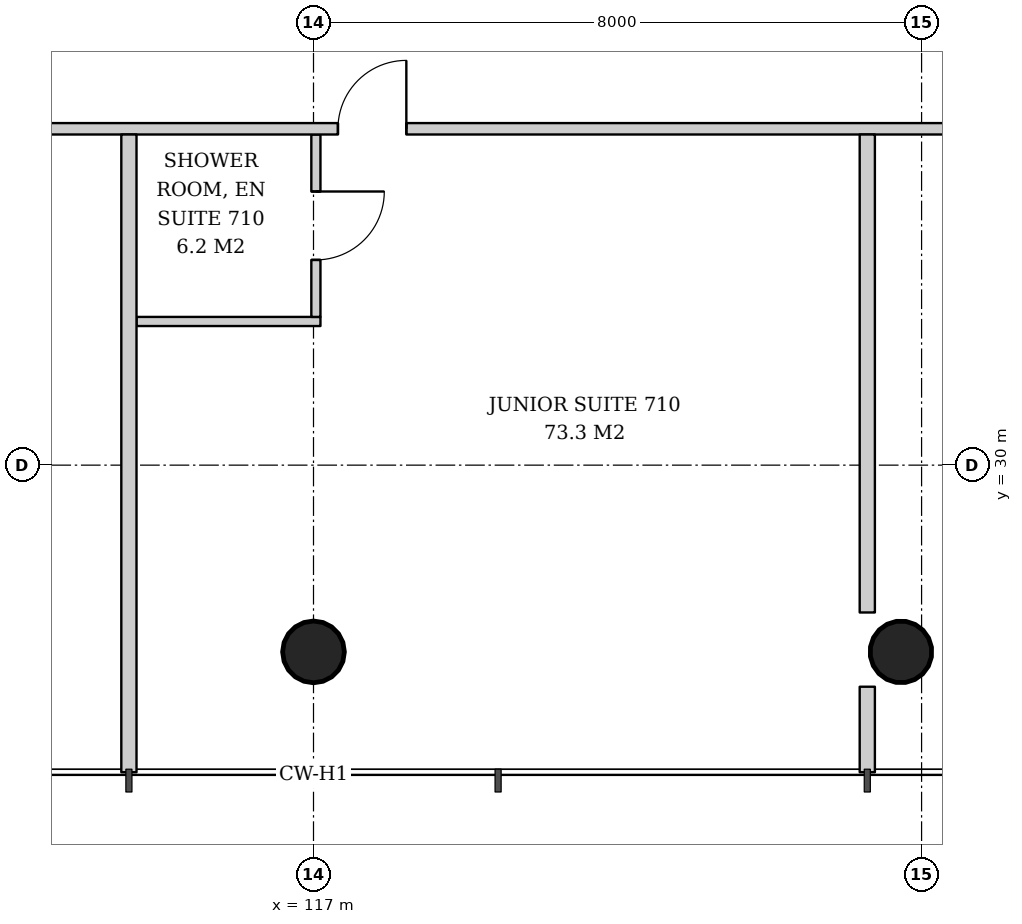
"""IFC4 building model, lengths in metres.
Left out: names, types, materials, properties, quantities, classifications, styles, units other than length and angle.
Written with IfcOpenShell. Run it as: python <this file> out.ifc"""

import sys

from ifc_helpers import new_model, si_unit, direction, frame, frame_2d, origin, origin_2d, place, context, subcontext, project, spatial, rectangle, hollow_circle, extrude, element, fill, save


model = new_model("IFC4")
c1 = context("Model", 3, precision=1e-05, world=origin(), true_north=direction((0.0, 1.0)))
c2 = subcontext(c1, "Body", "Model", "MODEL_VIEW")
j1 = project(units=[si_unit("LENGTHUNIT", "METRE"), si_unit("PLANEANGLEUNIT", "RADIAN")], contexts=[c1])
p1 = place(None, origin())
s1 = spatial("IfcSite", under=j1, at=p1, CompositionType="ELEMENT")
p2 = place(p1, origin())
s2 = spatial("IfcBuilding", under=s1, at=p2, CompositionType="ELEMENT")
p3 = place(p2, frame((0.0, 0.0, 32.4)))
s3 = spatial("IfcBuildingStorey", under=s2, at=p3, CompositionType="ELEMENT", Elevation=32.4)
p4 = place(p3, frame((117.0, 27.491, 0.0), z_axis=(0.0, 0.043069538298, 0.999072076915), x_axis=(-1.0, 0.0, 0.0)))
e1 = element("IfcColumn", 1, at=p4, inside=s3, PredefinedType="COLUMN", context=c2, shape_type="SweptSolid", body=[
    extrude(hollow_circle(Radius=0.406, WallThickness=0.03, at=origin_2d()), origin(), (0.0, 0.0, 1.0), 3.803),
])
p5 = place(p3, frame((124.754, 27.491, 0.0), z_axis=(-0.021561848751, 0.043059525333, 0.998839808957), x_axis=(-0.894160516368, -0.44774654769, 0.0)))
e2 = element("IfcColumn", 2, at=p5, inside=s3, PredefinedType="COLUMN", context=c2, shape_type="SweptSolid", body=[
    extrude(hollow_circle(Radius=0.406, WallThickness=0.03, at=origin_2d()), origin(), (0.0, 0.0, 1.0), 3.804),
])
p6 = place(p3, frame((114.671, 31.89, 0.0), z_axis=(0.0, 0.0, 1.0), x_axis=(1.0, 0.0, 0.0)))
e3 = element("IfcWall", 3, at=p6, inside=s3, PredefinedType="PARTITIONING", context=c2, shape_type="SweptSolid", body=[
    extrude(rectangle(XDim=2.42, YDim=0.12, at=frame_2d((1.21, 0.0))), origin(), (0.0, 0.0, 1.0), 2.847),
])
p7 = place(p3, frame((117.031, 34.35, 0.0), z_axis=(0.0, 0.0, 1.0), x_axis=(0.0, -1.0, 0.0)))
e4 = element("IfcWall", 4, at=p7, inside=s3, PredefinedType="PARTITIONING", context=c2, shape_type="SweptSolid", body=[
    extrude(rectangle(XDim=2.4, YDim=0.12, at=frame_2d((1.2, 0.0))), origin(), (0.0, 0.0, 1.0), 3.6),
])
p8 = place(p7, frame((0.75, 0.0, 0.0)))
e5 = element("IfcOpeningElement", 5, at=p8, cuts=e4, PredefinedType="OPENING", context=c2, shape_type="SweptSolid", body=[
    extrude(rectangle(XDim=0.9, YDim=2.1, at=frame_2d((0.45, 1.05))), frame((0.0, 0.07, 0.0), z_axis=(0.0, -1.0, 0.0), x_axis=(1.0, 0.0, 0.0)), (0.0, 0.0, 1.0), 0.14),
])
p9 = place(p3, frame((105.35, 34.425, 0.0), z_axis=(0.0, 0.0, 1.0), x_axis=(1.0, 0.0, 0.0)))
e6 = element("IfcWall", 6, at=p9, inside=s3, PredefinedType="PARTITIONING", context=c2, shape_type="SweptSolid", body=[
    extrude(rectangle(XDim=23.15, YDim=0.15, at=frame_2d((11.575, 0.0))), origin(), (0.0, 0.0, 1.0), 2.8),
])
p10 = place(p9, frame((1.757, 0.0, 0.0)))
e7 = element("IfcOpeningElement", 7, at=p10, cuts=e6, PredefinedType="OPENING", context=c2, shape_type="SweptSolid", body=[
    extrude(rectangle(XDim=0.9, YDim=2.1, at=frame_2d((0.45, 1.05))), frame((0.0, 0.085, 0.0), z_axis=(0.0, -1.0, 0.0), x_axis=(1.0, 0.0, 0.0)), (0.0, 0.0, 1.0), 0.17),
])
p11 = place(p9, frame((11.971, 0.0, 0.0)))
e8 = element("IfcOpeningElement", 8, at=p11, cuts=e6, PredefinedType="OPENING", context=c2, shape_type="SweptSolid", body=[
    extrude(rectangle(XDim=0.9, YDim=2.1, at=frame_2d((0.45, 1.05))), frame((0.0, 0.085, 0.0), z_axis=(0.0, -1.0, 0.0), x_axis=(1.0, 0.0, 0.0)), (0.0, 0.0, 1.0), 0.17),
])
p12 = place(p3, frame((114.572, 34.35, 0.0), z_axis=(0.0, 0.0, 1.0), x_axis=(0.0, -1.0, 0.0)))
e9 = element("IfcWall", 9, at=p12, inside=s3, PredefinedType="PARTITIONING", context=c2, shape_type="SweptSolid", body=[
    extrude(rectangle(XDim=8.39, YDim=0.2, at=frame_2d((4.195, 0.0))), origin(), (0.0, 0.0, 1.0), 3.05),
])
p13 = place(p3, frame((124.286, 34.35, 0.0), z_axis=(0.0, 0.0, 1.0), x_axis=(0.0, -1.0, 0.0)))
e10 = element("IfcWall", 10, at=p13, inside=s3, PredefinedType="PARTITIONING", context=c2, shape_type="SweptSolid", body=[
    extrude(rectangle(XDim=6.288, YDim=0.2, at=frame_2d((3.144, 0.0))), origin(), (0.0, 0.0, 1.0), 3.6),
])
p14 = place(p3, frame((124.286, 27.085, 0.0), z_axis=(0.0, 0.0, 1.0), x_axis=(0.0, -1.0, 0.0)))
e11 = element("IfcWall", 11, at=p14, inside=s3, PredefinedType="PARTITIONING", context=c2, shape_type="SweptSolid", body=[
    extrude(rectangle(XDim=1.125, YDim=0.2, at=frame_2d((0.562, 0.0))), origin(), (0.0, 0.0, 1.0), 3.6),
])
p15 = place(p8, origin())
e12 = element("IfcDoor", 12, at=p15, inside=s3, OperationType="SINGLE_SWING_LEFT", PredefinedType="DOOR", context=c2, shape_type="SweptSolid", body=[
    extrude(rectangle(XDim=0.9, YDim=2.1, at=frame_2d((0.45, 1.05))), frame((0.0, 0.025, 0.0), z_axis=(0.0, -1.0, 0.0), x_axis=(1.0, 0.0, 0.0)), (0.0, 0.0, 1.0), 0.05),
])
fill(e5, e12)
p16 = place(p11, origin())
e13 = element("IfcDoor", 13, at=p16, inside=s3, OperationType="SINGLE_SWING_RIGHT", PredefinedType="DOOR", context=c2, shape_type="SweptSolid", body=[
    extrude(rectangle(XDim=0.9, YDim=2.1, at=frame_2d((0.45, 1.05))), frame((0.0, 0.025, 0.0), z_axis=(0.0, -1.0, 0.0), x_axis=(1.0, 0.0, 0.0)), (0.0, 0.0, 1.0), 0.05),
])
fill(e8, e13)
save(model, sys.argv[1])
